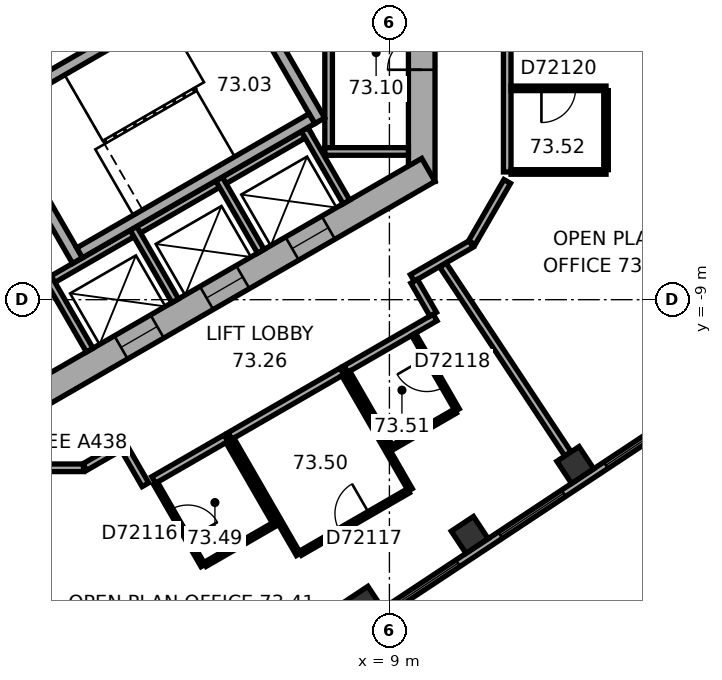
"""IFC4 building model, lengths in metres.
Left out: names, types, materials, properties, quantities, classifications, styles, units other than length and angle.
Written with IfcOpenShell. Run it as: python <this file> out.ifc"""

import sys

from ifc_helpers import new_model, si_unit, direction, frame, frame_2d, origin, origin_2d, place, context, subcontext, project, spatial, rectangle, extrude, element, fill, save


model = new_model("IFC4")
c1 = context("Model", 3, precision=1e-05, world=origin(), true_north=direction((0.0, 1.0)))
c2 = subcontext(c1, "Body", "Model", "MODEL_VIEW")
j1 = project(units=[si_unit("LENGTHUNIT", "METRE"), si_unit("PLANEANGLEUNIT", "RADIAN")], contexts=[c1])
p1 = place(None, origin())
s1 = spatial("IfcSite", under=j1, at=p1, CompositionType="ELEMENT")
p2 = place(p1, origin())
s2 = spatial("IfcBuilding", under=s1, at=p2, CompositionType="ELEMENT")
p3 = place(p2, frame((0.0, 0.0, 296.8)))
s3 = spatial("IfcBuildingStorey", under=s2, at=p3, CompositionType="ELEMENT", Elevation=296.8)
for number, where, z_axis, x_axis in (
    (1, (8.335, -17.028, 0.0), (0.0, 0.0, 1.0), (0.834, 0.552, 0.0)),
    (2, (11.113, -15.189, 0.0), (0.0, 0.0, 1.0), (0.834, 0.552, 0.0)),
    (3, (13.891, -13.351, 0.0), (0.0, 0.0, 1.0), (0.834, 0.552, 0.0)),
):
    element("IfcColumn", number, at=place(p3, frame(where, z_axis=z_axis, x_axis=x_axis)), inside=s3, PredefinedType="COLUMN", context=c2, shape_type="SweptSolid", body=[
        extrude(rectangle(XDim=0.7, YDim=0.7, at=origin_2d()), origin(), (0.0, 0.0, 1.0), 3.7),
    ])
p4 = place(p3, frame((9.85, -5.889, 0.0), z_axis=(0.0, 0.0, 1.0), x_axis=(0.0, 1.0, 0.0)))
e4 = element("IfcWall", 4, at=p4, inside=s3, PredefinedType="SHEAR", context=c2, shape_type="SweptSolid", body=[
    extrude(rectangle(XDim=11.778, YDim=0.7, at=frame_2d((5.889, 0.0))), origin(), (0.0, 0.0, 1.0), 3.7),
])
p5 = place(p4, frame((6.089, 0.0, 0.0)))
e5 = element("IfcOpeningElement", 5, at=p5, cuts=e4, PredefinedType="OPENING", context=c2, shape_type="SweptSolid", body=[
    extrude(rectangle(XDim=1.5, YDim=2.1, at=frame_2d((0.75, 1.05))), frame((0.0, 0.36, 0.0), z_axis=(0.0, -1.0, 0.0), x_axis=(1.0, 0.0, 0.0)), (0.0, 0.0, 1.0), 0.72),
])
p6 = place(p4, frame((2.939, 0.0, 0.0)))
e6 = element("IfcOpeningElement", 6, at=p6, cuts=e4, PredefinedType="OPENING", context=c2, shape_type="SweptSolid", body=[
    extrude(rectangle(XDim=0.9, YDim=2.1, at=frame_2d((0.45, 1.05))), frame((0.0, 0.36, 0.0), z_axis=(0.0, -1.0, 0.0), x_axis=(1.0, 0.0, 0.0)), (0.0, 0.0, 1.0), 0.72),
])
p7 = place(p3, frame((-10.025, -5.586, 0.0), z_axis=(0.0, 0.0, 1.0), x_axis=(0.866026453023, -0.499998182661, 0.0)))
e7 = element("IfcWall", 7, at=p7, inside=s3, PredefinedType="SHEAR", context=c2, shape_type="SweptSolid", body=[
    extrude(rectangle(XDim=11.778, YDim=0.7, at=frame_2d((5.889, 0.0))), origin(), (0.0, 0.0, 1.0), 3.7),
])
p8 = place(p7, frame((6.089, 0.0, 0.0)))
e8 = element("IfcOpeningElement", 8, at=p8, cuts=e7, PredefinedType="OPENING", context=c2, shape_type="SweptSolid", body=[
    extrude(rectangle(XDim=1.5, YDim=2.1, at=frame_2d((0.75, 1.05))), frame((0.0, 0.36, 0.0), z_axis=(0.0, -1.0, 0.0), x_axis=(1.0, 0.0, 0.0)), (0.0, 0.0, 1.0), 0.72),
])
p9 = place(p7, frame((1.539, 0.0, 0.0)))
e9 = element("IfcOpeningElement", 9, at=p9, cuts=e7, PredefinedType="OPENING", context=c2, shape_type="SweptSolid", body=[
    extrude(rectangle(XDim=1.1, YDim=2.1, at=frame_2d((0.55, 1.05))), frame((0.0, 0.36, 0.0), z_axis=(0.0, -1.0, 0.0), x_axis=(1.0, 0.0, 0.0)), (0.0, 0.0, 1.0), 0.72),
])
p10 = place(p7, frame((4.139, 0.0, 0.0)))
e10 = element("IfcOpeningElement", 10, at=p10, cuts=e7, PredefinedType="OPENING", context=c2, shape_type="SweptSolid", body=[
    extrude(rectangle(XDim=1.1, YDim=2.1, at=frame_2d((0.55, 1.05))), frame((0.0, 0.36, 0.0), z_axis=(0.0, -1.0, 0.0), x_axis=(1.0, 0.0, 0.0)), (0.0, 0.0, 1.0), 0.72),
])
p11 = place(p3, frame((-0.175, -11.475, 0.0), z_axis=(0.0, 0.0, 1.0), x_axis=(0.866026453023, 0.499998182661, 0.0)))
e11 = element("IfcWall", 11, at=p11, inside=s3, PredefinedType="SHEAR", context=c2, shape_type="SweptSolid", body=[
    extrude(rectangle(XDim=11.778, YDim=0.7, at=frame_2d((5.889, 0.0))), origin(), (0.0, 0.0, 1.0), 3.7),
])
p12 = place(p11, frame((2.439, 0.0, 0.0)))
e12 = element("IfcOpeningElement", 12, at=p12, cuts=e11, PredefinedType="OPENING", context=c2, shape_type="SweptSolid", body=[
    extrude(rectangle(XDim=1.1, YDim=2.1, at=frame_2d((0.55, 1.05))), frame((0.0, 0.36, 0.0), z_axis=(0.0, -1.0, 0.0), x_axis=(1.0, 0.0, 0.0)), (0.0, 0.0, 1.0), 0.72),
])
p13 = place(p11, frame((5.039, 0.0, 0.0)))
e13 = element("IfcOpeningElement", 13, at=p13, cuts=e11, PredefinedType="OPENING", context=c2, shape_type="SweptSolid", body=[
    extrude(rectangle(XDim=1.1, YDim=2.1, at=frame_2d((0.55, 1.05))), frame((0.0, 0.36, 0.0), z_axis=(0.0, -1.0, 0.0), x_axis=(1.0, 0.0, 0.0)), (0.0, 0.0, 1.0), 0.72),
])
p14 = place(p11, frame((7.639, 0.0, 0.0)))
e14 = element("IfcOpeningElement", 14, at=p14, cuts=e11, PredefinedType="OPENING", context=c2, shape_type="SweptSolid", body=[
    extrude(rectangle(XDim=1.1, YDim=2.1, at=frame_2d((0.55, 1.05))), frame((0.0, 0.36, 0.0), z_axis=(0.0, -1.0, 0.0), x_axis=(1.0, 0.0, 0.0)), (0.0, 0.0, 1.0), 0.72),
])
p15 = place(p3, frame((2.58, -21.377, 0.0), z_axis=(0.0, 0.0, 1.0), x_axis=(0.833888592176, 0.551932800112, 0.0)))
e15 = element("IfcWall", 15, at=p15, inside=s3, PredefinedType="STANDARD", context=c2, shape_type="SweptSolid", body=[
    extrude(rectangle(XDim=17.731, YDim=0.2, at=frame_2d((8.866, 0.0))), origin(), (0.0, 0.0, 1.0), 3.7),
])
p16 = place(p15, frame((1.202, 0.0, 0.9)))
e16 = element("IfcOpeningElement", 16, at=p16, cuts=e15, PredefinedType="OPENING", context=c2, shape_type="SweptSolid", body=[
    extrude(rectangle(XDim=2.0, YDim=2.0, at=frame_2d((1.0, 1.0))), frame((0.0, 0.11, 0.0), z_axis=(0.0, -1.0, 0.0), x_axis=(1.0, 0.0, 0.0)), (0.0, 0.0, 1.0), 0.22),
])
p17 = place(p15, frame((4.533, 0.0, 0.9)))
e17 = element("IfcOpeningElement", 17, at=p17, cuts=e15, PredefinedType="OPENING", context=c2, shape_type="SweptSolid", body=[
    extrude(rectangle(XDim=2.0, YDim=2.0, at=frame_2d((1.0, 1.0))), frame((0.0, 0.11, 0.0), z_axis=(0.0, -1.0, 0.0), x_axis=(1.0, 0.0, 0.0)), (0.0, 0.0, 1.0), 0.22),
])
p18 = place(p15, frame((7.865, 0.0, 0.9)))
e18 = element("IfcOpeningElement", 18, at=p18, cuts=e15, PredefinedType="OPENING", context=c2, shape_type="SweptSolid", body=[
    extrude(rectangle(XDim=2.0, YDim=2.0, at=frame_2d((1.0, 1.0))), frame((0.0, 0.11, 0.0), z_axis=(0.0, -1.0, 0.0), x_axis=(1.0, 0.0, 0.0)), (0.0, 0.0, 1.0), 0.22),
])
p19 = place(p15, frame((11.197, 0.0, 0.9)))
e19 = element("IfcOpeningElement", 19, at=p19, cuts=e15, PredefinedType="OPENING", context=c2, shape_type="SweptSolid", body=[
    extrude(rectangle(XDim=2.0, YDim=2.0, at=frame_2d((1.0, 1.0))), frame((0.0, 0.11, 0.0), z_axis=(0.0, -1.0, 0.0), x_axis=(1.0, 0.0, 0.0)), (0.0, 0.0, 1.0), 0.22),
])
p20 = place(p15, frame((14.528, 0.0, 0.9)))
e20 = element("IfcOpeningElement", 20, at=p20, cuts=e15, PredefinedType="OPENING", context=c2, shape_type="SweptSolid", body=[
    extrude(rectangle(XDim=2.0, YDim=2.0, at=frame_2d((1.0, 1.0))), frame((0.0, 0.11, 0.0), z_axis=(0.0, -1.0, 0.0), x_axis=(1.0, 0.0, 0.0)), (0.0, 0.0, 1.0), 0.22),
])
p21 = place(p3, frame((7.4, -5.2, 0.0), z_axis=(0.0, 0.0, 1.0), x_axis=(0.0, 1.0, 0.0)))
e21 = element("IfcWall", 21, at=p21, inside=s3, PredefinedType="PARTITIONING", context=c2, shape_type="SweptSolid", body=[
    extrude(rectangle(XDim=5.4, YDim=0.2, at=frame_2d((2.7, 0.0))), origin(), (0.0, 0.0, 1.0), 3.35),
])
p22 = place(p3, frame((7.3, -5.1, 0.0), z_axis=(0.0, 0.0, 1.0), x_axis=(1.0, 0.0, 0.0)))
e22 = element("IfcWall", 22, at=p22, inside=s3, PredefinedType="PARTITIONING", context=c2, shape_type="SweptSolid", body=[
    extrude(rectangle(XDim=2.2, YDim=0.2, at=frame_2d((1.1, 0.0))), origin(), (0.0, 0.0, 1.0), 3.35),
])
p23 = place(p3, frame((-0.024, -8.559, 0.0), z_axis=(0.0, 0.0, 1.0), x_axis=(0.866026010844, 0.49999894854, 0.0)))
e23 = element("IfcWall", 23, at=p23, inside=s3, PredefinedType="PARTITIONING", context=c2, shape_type="SweptSolid", body=[
    extrude(rectangle(XDim=8.0, YDim=0.2, at=frame_2d((4.0, 0.0))), origin(), (0.0, 0.0, 1.0), 3.35),
])
for number, where, z_axis, x_axis in (
    (24, (0.013, -8.422, 0.0), (0.0, 0.0, 1.0), (0.5, -0.866, 0.0)),
    (25, (2.264, -7.122, 0.0), (0.0, 0.0, 1.0), (0.5, -0.866, 0.0)),
    (26, (4.516, -5.822, 0.0), (0.0, 0.0, 1.0), (0.5, -0.866, 0.0)),
    (27, (6.768, -4.522, 0.0), (0.0, 0.0, 1.0), (0.5, -0.866, 0.0)),
):
    element("IfcWall", number, at=place(p3, frame(where, z_axis=z_axis, x_axis=x_axis)), inside=s3, PredefinedType="PARTITIONING", context=c2, shape_type="SweptSolid", body=[
        extrude(rectangle(XDim=2.2, YDim=0.2, at=frame_2d((1.1, 0.0))), origin(), (0.0, 0.0, 1.0), 3.35),
    ])
p24 = place(p3, frame((-1.558, -3.902, 0.0), z_axis=(0.0, 0.0, 1.0), x_axis=(0.499977259774, -0.866038532462, 0.0)))
e28 = element("IfcWall", 28, at=p24, inside=s3, PredefinedType="SHEAR", context=c2, shape_type="SweptSolid", body=[
    extrude(rectangle(XDim=4.7, YDim=0.3, at=frame_2d((2.35, 0.0))), origin(), (0.0, 0.0, 1.0), 3.35),
])
p25 = place(p24, frame((0.8, 0.0, 0.0)))
e29 = element("IfcOpeningElement", 29, at=p25, cuts=e28, PredefinedType="OPENING", context=c2, shape_type="SweptSolid", body=[
    extrude(rectangle(XDim=1.2, YDim=2.1, at=frame_2d((0.6, 1.05))), frame((0.0, 0.16, 0.0), z_axis=(0.0, -1.0, 0.0), x_axis=(1.0, 0.0, 0.0)), (0.0, 0.0, 1.0), 0.32),
])
p26 = place(p3, frame((4.816, -0.222, 0.0), z_axis=(0.0, 0.0, 1.0), x_axis=(0.499977259774, -0.866038532462, 0.0)))
e30 = element("IfcWall", 30, at=p26, inside=s3, PredefinedType="SHEAR", context=c2, shape_type="SweptSolid", body=[
    extrude(rectangle(XDim=4.7, YDim=0.3, at=frame_2d((2.35, 0.0))), origin(), (0.0, 0.0, 1.0), 3.35),
])
for number, where, z_axis, x_axis in (
    (31, (-1.353, -3.957, 0.0), (0.0, 0.0, 1.0), (0.866, 0.5, 0.0)),
    (32, (0.847, -7.767, 0.0), (0.0, 0.0, 1.0), (0.866, 0.5, 0.0)),
):
    element("IfcWall", number, at=place(p3, frame(where, z_axis=z_axis, x_axis=x_axis)), inside=s3, PredefinedType="SHEAR", context=c2, shape_type="SweptSolid", body=[
        extrude(rectangle(XDim=7.06, YDim=0.3, at=frame_2d((3.53, 0.0))), origin(), (0.0, 0.0, 1.0), 3.35),
    ])
p27 = place(p3, frame((-0.91, -13.423, 0.0), z_axis=(0.0, 0.0, 1.0), x_axis=(1.0, 0.0, 0.0)))
e33 = element("IfcWall", 33, at=p27, inside=s3, PredefinedType="PARTITIONING", context=c2, shape_type="SweptSolid", body=[
    extrude(rectangle(XDim=1.86, YDim=0.2, at=frame_2d((0.93, 0.0))), origin(), (0.0, 0.0, 1.0), 3.35),
])
p28 = place(p3, frame((0.985, -13.403, 0.0), z_axis=(0.0, 0.0, 1.0), x_axis=(0.866022668282, 0.500004737999, 0.0)))
e34 = element("IfcWall", 34, at=p28, inside=s3, PredefinedType="PARTITIONING", context=c2, shape_type="SweptSolid", body=[
    extrude(rectangle(XDim=1.148, YDim=0.2, at=frame_2d((0.574, 0.0))), origin(), (0.0, 0.0, 1.0), 3.35),
])
p29 = place(p3, frame((2.029, -12.916, 0.0), z_axis=(0.0, 0.0, 1.0), x_axis=(0.500074377092, -0.865982457891, 0.0)))
e35 = element("IfcWall", 35, at=p29, inside=s3, PredefinedType="PARTITIONING", context=c2, shape_type="SweptSolid", body=[
    extrude(rectangle(XDim=1.101, YDim=0.2, at=frame_2d((0.55, 0.0))), origin(), (0.0, 0.0, 1.0), 3.35),
])
p30 = place(p3, frame((2.796, -13.744, 0.0), z_axis=(0.0, 0.0, 1.0), x_axis=(0.86605622881, 0.499946605688, 0.0)))
e36 = element("IfcWall", 36, at=p30, inside=s3, PredefinedType="PARTITIONING", context=c2, shape_type="SweptSolid", body=[
    extrude(rectangle(XDim=2.2, YDim=0.2, at=frame_2d((1.1, 0.0))), origin(), (0.0, 0.0, 1.0), 3.35),
])
p31 = place(p3, frame((4.096, -15.996, 0.0), z_axis=(0.0, 0.0, 1.0), x_axis=(-0.500004234368, 0.866022959057, 0.0)))
e37 = element("IfcWall", 37, at=p31, inside=s3, PredefinedType="PARTITIONING", context=c2, shape_type="SweptSolid", body=[
    extrude(rectangle(XDim=2.5, YDim=0.12, at=frame_2d((1.25, 0.0))), origin(), (0.0, 0.0, 1.0), 3.35),
])
p32 = place(p31, frame((0.8, 0.0, 0.0)))
e38 = element("IfcOpeningElement", 38, at=p32, cuts=e37, PredefinedType="OPENING", context=c2, shape_type="SweptSolid", body=[
    extrude(rectangle(XDim=0.9, YDim=2.1, at=frame_2d((0.45, 1.05))), frame((0.0, 0.07, 0.0), z_axis=(0.0, -1.0, 0.0), x_axis=(1.0, 0.0, 0.0)), (0.0, 0.0, 1.0), 0.14),
])
p33 = place(p3, frame((4.751, -12.731, 0.0), z_axis=(0.0, 0.0, 1.0), x_axis=(0.500004234368, -0.866022959057, 0.0)))
e39 = element("IfcWall", 39, at=p33, inside=s3, PredefinedType="PARTITIONING", context=c2, shape_type="SweptSolid", body=[
    extrude(rectangle(XDim=2.5, YDim=0.12, at=frame_2d((1.25, 0.0))), origin(), (0.0, 0.0, 1.0), 3.35),
])
p34 = place(p3, frame((4.805, -12.584, 0.0), z_axis=(0.0, 0.0, 1.0), x_axis=(0.866038511948, 0.499977295307, 0.0)))
e40 = element("IfcWall", 40, at=p34, inside=s3, PredefinedType="PARTITIONING", context=c2, shape_type="SweptSolid", body=[
    extrude(rectangle(XDim=3.4, YDim=0.2, at=frame_2d((1.7, 0.0))), origin(), (0.0, 0.0, 1.0), 3.35),
])
p35 = place(p3, frame((5.949, -14.926, 0.0), z_axis=(0.0, 0.0, 1.0), x_axis=(-0.866039004929, -0.499976441387, 0.0)))
e41 = element("IfcWall", 41, at=p35, inside=s3, PredefinedType="PARTITIONING", context=c2, shape_type="SweptSolid", body=[
    extrude(rectangle(XDim=2.08, YDim=0.12, at=frame_2d((1.04, 0.0))), origin(), (0.0, 0.0, 1.0), 3.35),
])
for number, where, z_axis, x_axis in (
    (42, (6.605, -15.702, 0.0), (0.0, 0.0, 1.0), (-0.5, 0.866, 0.0)),
    (43, (7.8, -10.971, 0.0), (0.0, 0.0, 1.0), (0.5, -0.866, 0.0)),
):
    element("IfcWall", number, at=place(p3, frame(where, z_axis=z_axis, x_axis=x_axis)), inside=s3, PredefinedType="PARTITIONING", context=c2, shape_type="SweptSolid", body=[
        extrude(rectangle(XDim=3.5, YDim=0.12, at=frame_2d((1.75, 0.0))), origin(), (0.0, 0.0, 1.0), 3.35),
    ])
p36 = place(p3, frame((7.854, -10.824, 0.0), z_axis=(0.0, 0.0, 1.0), x_axis=(0.866029675718, 0.499992600721, 0.0)))
e44 = element("IfcWall", 44, at=p36, inside=s3, PredefinedType="PARTITIONING", context=c2, shape_type="SweptSolid", body=[
    extrude(rectangle(XDim=2.712, YDim=0.2, at=frame_2d((1.356, 0.0))), origin(), (0.0, 0.0, 1.0), 3.35),
])
p37 = place(p3, frame((9.053, -12.903, 0.0), z_axis=(0.0, 0.0, 1.0), x_axis=(-0.500031774688, 0.866007057882, 0.0)))
e45 = element("IfcWall", 45, at=p37, inside=s3, PredefinedType="PARTITIONING", context=c2, shape_type="SweptSolid", body=[
    extrude(rectangle(XDim=2.3, YDim=0.12, at=frame_2d((1.15, 0.0))), origin(), (0.0, 0.0, 1.0), 3.35),
])
p38 = place(p3, frame((9.498, -14.032, 0.0), z_axis=(0.0, 0.0, 1.0), x_axis=(-0.866040564224, -0.499973740429, 0.0)))
e46 = element("IfcWall", 46, at=p38, inside=s3, PredefinedType="PARTITIONING", context=c2, shape_type="SweptSolid", body=[
    extrude(rectangle(XDim=3.28, YDim=0.12, at=frame_2d((1.64, 0.0))), origin(), (0.0, 0.0, 1.0), 3.35),
])
p39 = place(p38, frame((1.19, 0.0, 0.0)))
e47 = element("IfcOpeningElement", 47, at=p39, cuts=e46, PredefinedType="OPENING", context=c2, shape_type="SweptSolid", body=[
    extrude(rectangle(XDim=0.9, YDim=2.1, at=frame_2d((0.45, 1.05))), frame((0.0, 0.07, 0.0), z_axis=(0.0, -1.0, 0.0), x_axis=(1.0, 0.0, 0.0)), (0.0, 0.0, 1.0), 0.14),
])
p40 = place(p3, frame((9.602, -8.428, 0.0), z_axis=(0.0, 0.0, 1.0), x_axis=(0.865999114786, 0.500045531117, 0.0)))
e48 = element("IfcWall", 48, at=p40, inside=s3, PredefinedType="PARTITIONING", context=c2, shape_type="SweptSolid", body=[
    extrude(rectangle(XDim=1.788, YDim=0.2, at=frame_2d((0.894, 0.0))), origin(), (0.0, 0.0, 1.0), 3.35),
])
p41 = place(p3, frame((9.635, -9.911, 0.0), z_axis=(0.0, 0.0, 1.0), x_axis=(0.499952165731, -0.866053019151, 0.0)))
e49 = element("IfcWall", 49, at=p41, inside=s3, PredefinedType="PARTITIONING", context=c2, shape_type="SweptSolid", body=[
    extrude(rectangle(XDim=2.3, YDim=0.12, at=frame_2d((1.15, 0.0))), origin(), (0.0, 0.0, 1.0), 3.35),
])
p42 = place(p41, frame((0.7, 0.0, 0.0)))
e50 = element("IfcOpeningElement", 50, at=p42, cuts=e49, PredefinedType="OPENING", context=c2, shape_type="SweptSolid", body=[
    extrude(rectangle(XDim=0.9, YDim=2.1, at=frame_2d((0.45, 1.05))), frame((0.0, 0.07, 0.0), z_axis=(0.0, -1.0, 0.0), x_axis=(1.0, 0.0, 0.0)), (0.0, 0.0, 1.0), 0.14),
])
p43 = place(p3, frame((10.152, -9.382, 0.0), z_axis=(0.0, 0.0, 1.0), x_axis=(-0.499968756647, 0.866043441391, 0.0)))
e51 = element("IfcWall", 51, at=p43, inside=s3, PredefinedType="PARTITIONING", context=c2, shape_type="SweptSolid", body=[
    extrude(rectangle(XDim=1.001, YDim=0.2, at=frame_2d((0.5, 0.0))), origin(), (0.0, 0.0, 1.0), 3.35),
])
p44 = place(p3, frame((10.733, -11.933, 0.0), z_axis=(0.0, 0.0, 1.0), x_axis=(-0.866012558475, -0.500022248069, 0.0)))
e52 = element("IfcWall", 52, at=p44, inside=s3, PredefinedType="PARTITIONING", context=c2, shape_type="SweptSolid", body=[
    extrude(rectangle(XDim=1.88, YDim=0.12, at=frame_2d((0.94, 0.0))), origin(), (0.0, 0.0, 1.0), 3.35),
])
p45 = place(p3, frame((11.17, -7.5, 0.0), z_axis=(0.0, 0.0, 1.0), x_axis=(0.500006454166, 0.866021677438, 0.0)))
e53 = element("IfcWall", 53, at=p45, inside=s3, PredefinedType="PARTITIONING", context=c2, shape_type="SweptSolid", body=[
    extrude(rectangle(XDim=1.86, YDim=0.2, at=frame_2d((0.93, 0.0))), origin(), (0.0, 0.0, 1.0), 3.35),
])
p46 = place(p3, frame((12.1, -5.639, 0.0), z_axis=(0.0, 0.0, 1.0), x_axis=(0.0, 1.0, 0.0)))
e54 = element("IfcWall", 54, at=p46, inside=s3, PredefinedType="PARTITIONING", context=c2, shape_type="SweptSolid", body=[
    extrude(rectangle(XDim=4.756, YDim=0.2, at=frame_2d((2.378, 0.0))), origin(), (0.0, 0.0, 1.0), 3.35),
])
p47 = place(p3, frame((12.2, -3.439, 0.0), z_axis=(0.0, 0.0, 1.0), x_axis=(1.0, 0.0, 0.0)))
e55 = element("IfcWall", 55, at=p47, inside=s3, PredefinedType="PARTITIONING", context=c2, shape_type="SweptSolid", body=[
    extrude(rectangle(XDim=2.5, YDim=0.12, at=frame_2d((1.25, 0.0))), origin(), (0.0, 0.0, 1.0), 3.35),
])
p48 = place(p47, frame((0.8, 0.0, 0.0)))
e56 = element("IfcOpeningElement", 56, at=p48, cuts=e55, PredefinedType="OPENING", context=c2, shape_type="SweptSolid", body=[
    extrude(rectangle(XDim=0.9, YDim=2.1, at=frame_2d((0.45, 1.05))), frame((0.0, 0.07, 0.0), z_axis=(0.0, -1.0, 0.0), x_axis=(1.0, 0.0, 0.0)), (0.0, 0.0, 1.0), 0.14),
])
p49 = place(p3, frame((13.698, -13.059, 0.0), z_axis=(0.0, 0.0, 1.0), x_axis=(-0.551927229301, 0.833892279348, 0.0)))
e57 = element("IfcWall", 57, at=p49, inside=s3, PredefinedType="PARTITIONING", context=c2, shape_type="SweptSolid", body=[
    extrude(rectangle(XDim=5.96, YDim=0.2, at=frame_2d((2.98, 0.0))), origin(), (0.0, 0.0, 1.0), 2.65),
])
p50 = place(p3, frame((14.7, -5.639, 0.0), z_axis=(0.0, 0.0, 1.0), x_axis=(-1.0, 0.0, 0.0)))
e58 = element("IfcWall", 58, at=p50, inside=s3, PredefinedType="PARTITIONING", context=c2, shape_type="SweptSolid", body=[
    extrude(rectangle(XDim=2.5, YDim=0.12, at=frame_2d((1.25, 0.0))), origin(), (0.0, 0.0, 1.0), 3.35),
])
p51 = place(p3, frame((14.7, -3.499, 0.0), z_axis=(0.0, 0.0, 1.0), x_axis=(0.0, -1.0, 0.0)))
e59 = element("IfcWall", 59, at=p51, inside=s3, PredefinedType="PARTITIONING", context=c2, shape_type="SweptSolid", body=[
    extrude(rectangle(XDim=2.08, YDim=0.12, at=frame_2d((1.04, 0.0))), origin(), (0.0, 0.0, 1.0), 3.35),
])
p52 = place(p18, origin())
e60 = element("IfcWindow", 60, at=p52, inside=s3, PartitioningType="SINGLE_PANEL", PredefinedType="WINDOW", context=c2, shape_type="SweptSolid", body=[
    extrude(rectangle(XDim=2.0, YDim=2.0, at=frame_2d((1.0, 1.0))), frame((0.0, 0.03, 0.0), z_axis=(0.0, -1.0, 0.0), x_axis=(1.0, 0.0, 0.0)), (0.0, 0.0, 1.0), 0.06),
])
fill(e18, e60)
p53 = place(p19, origin())
e61 = element("IfcWindow", 61, at=p53, inside=s3, PartitioningType="SINGLE_PANEL", PredefinedType="WINDOW", context=c2, shape_type="SweptSolid", body=[
    extrude(rectangle(XDim=2.0, YDim=2.0, at=frame_2d((1.0, 1.0))), frame((0.0, 0.03, 0.0), z_axis=(0.0, -1.0, 0.0), x_axis=(1.0, 0.0, 0.0)), (0.0, 0.0, 1.0), 0.06),
])
fill(e19, e61)
p54 = place(p20, origin())
e62 = element("IfcWindow", 62, at=p54, inside=s3, PartitioningType="SINGLE_PANEL", PredefinedType="WINDOW", context=c2, shape_type="SweptSolid", body=[
    extrude(rectangle(XDim=2.0, YDim=2.0, at=frame_2d((1.0, 1.0))), frame((0.0, 0.03, 0.0), z_axis=(0.0, -1.0, 0.0), x_axis=(1.0, 0.0, 0.0)), (0.0, 0.0, 1.0), 0.06),
])
fill(e20, e62)
p55 = place(p6, origin())
e63 = element("IfcDoor", 63, at=p55, inside=s3, OperationType="SINGLE_SWING_LEFT", PredefinedType="DOOR", context=c2, shape_type="SweptSolid", body=[
    extrude(rectangle(XDim=0.9, YDim=2.1, at=frame_2d((0.45, 1.05))), frame((0.0, 0.025, 0.0), z_axis=(0.0, -1.0, 0.0), x_axis=(1.0, 0.0, 0.0)), (0.0, 0.0, 1.0), 0.05),
])
fill(e6, e63)
p56 = place(p12, origin())
e64 = element("IfcDoor", 64, at=p56, inside=s3, OperationType="DOUBLE_DOOR_SLIDING", PredefinedType="DOOR", context=c2, shape_type="SweptSolid", body=[
    extrude(rectangle(XDim=1.1, YDim=2.1, at=frame_2d((0.55, 1.05))), frame((0.0, 0.025, 0.0), z_axis=(0.0, -1.0, 0.0), x_axis=(1.0, 0.0, 0.0)), (0.0, 0.0, 1.0), 0.05),
])
fill(e12, e64)
p57 = place(p13, origin())
e65 = element("IfcDoor", 65, at=p57, inside=s3, OperationType="DOUBLE_DOOR_SLIDING", PredefinedType="DOOR", context=c2, shape_type="SweptSolid", body=[
    extrude(rectangle(XDim=1.1, YDim=2.1, at=frame_2d((0.55, 1.05))), frame((0.0, 0.025, 0.0), z_axis=(0.0, -1.0, 0.0), x_axis=(1.0, 0.0, 0.0)), (0.0, 0.0, 1.0), 0.05),
])
fill(e13, e65)
p58 = place(p14, origin())
e66 = element("IfcDoor", 66, at=p58, inside=s3, OperationType="DOUBLE_DOOR_SLIDING", PredefinedType="DOOR", context=c2, shape_type="SweptSolid", body=[
    extrude(rectangle(XDim=1.1, YDim=2.1, at=frame_2d((0.55, 1.05))), frame((0.0, 0.025, 0.0), z_axis=(0.0, -1.0, 0.0), x_axis=(1.0, 0.0, 0.0)), (0.0, 0.0, 1.0), 0.05),
])
fill(e14, e66)
p59 = place(p32, origin())
e67 = element("IfcDoor", 67, at=p59, inside=s3, OperationType="SINGLE_SWING_LEFT", PredefinedType="DOOR", context=c2, shape_type="SweptSolid", body=[
    extrude(rectangle(XDim=0.9, YDim=2.1, at=frame_2d((0.45, 1.05))), frame((0.0, 0.025, 0.0), z_axis=(0.0, -1.0, 0.0), x_axis=(1.0, 0.0, 0.0)), (0.0, 0.0, 1.0), 0.05),
])
fill(e38, e67)
p60 = place(p39, origin())
e68 = element("IfcDoor", 68, at=p60, inside=s3, OperationType="SINGLE_SWING_LEFT", PredefinedType="DOOR", context=c2, shape_type="SweptSolid", body=[
    extrude(rectangle(XDim=0.9, YDim=2.1, at=frame_2d((0.45, 1.05))), frame((0.0, 0.025, 0.0), z_axis=(0.0, -1.0, 0.0), x_axis=(1.0, 0.0, 0.0)), (0.0, 0.0, 1.0), 0.05),
])
fill(e47, e68)
p61 = place(p42, origin())
e69 = element("IfcDoor", 69, at=p61, inside=s3, OperationType="SINGLE_SWING_LEFT", PredefinedType="DOOR", context=c2, shape_type="SweptSolid", body=[
    extrude(rectangle(XDim=0.9, YDim=2.1, at=frame_2d((0.45, 1.05))), frame((0.0, 0.025, 0.0), z_axis=(0.0, -1.0, 0.0), x_axis=(1.0, 0.0, 0.0)), (0.0, 0.0, 1.0), 0.05),
])
fill(e50, e69)
p62 = place(p48, origin())
e70 = element("IfcDoor", 70, at=p62, inside=s3, OperationType="SINGLE_SWING_LEFT", PredefinedType="DOOR", context=c2, shape_type="SweptSolid", body=[
    extrude(rectangle(XDim=0.9, YDim=2.1, at=frame_2d((0.45, 1.05))), frame((0.0, 0.025, 0.0), z_axis=(0.0, -1.0, 0.0), x_axis=(1.0, 0.0, 0.0)), (0.0, 0.0, 1.0), 0.05),
])
fill(e56, e70)
save(model, sys.argv[1])
